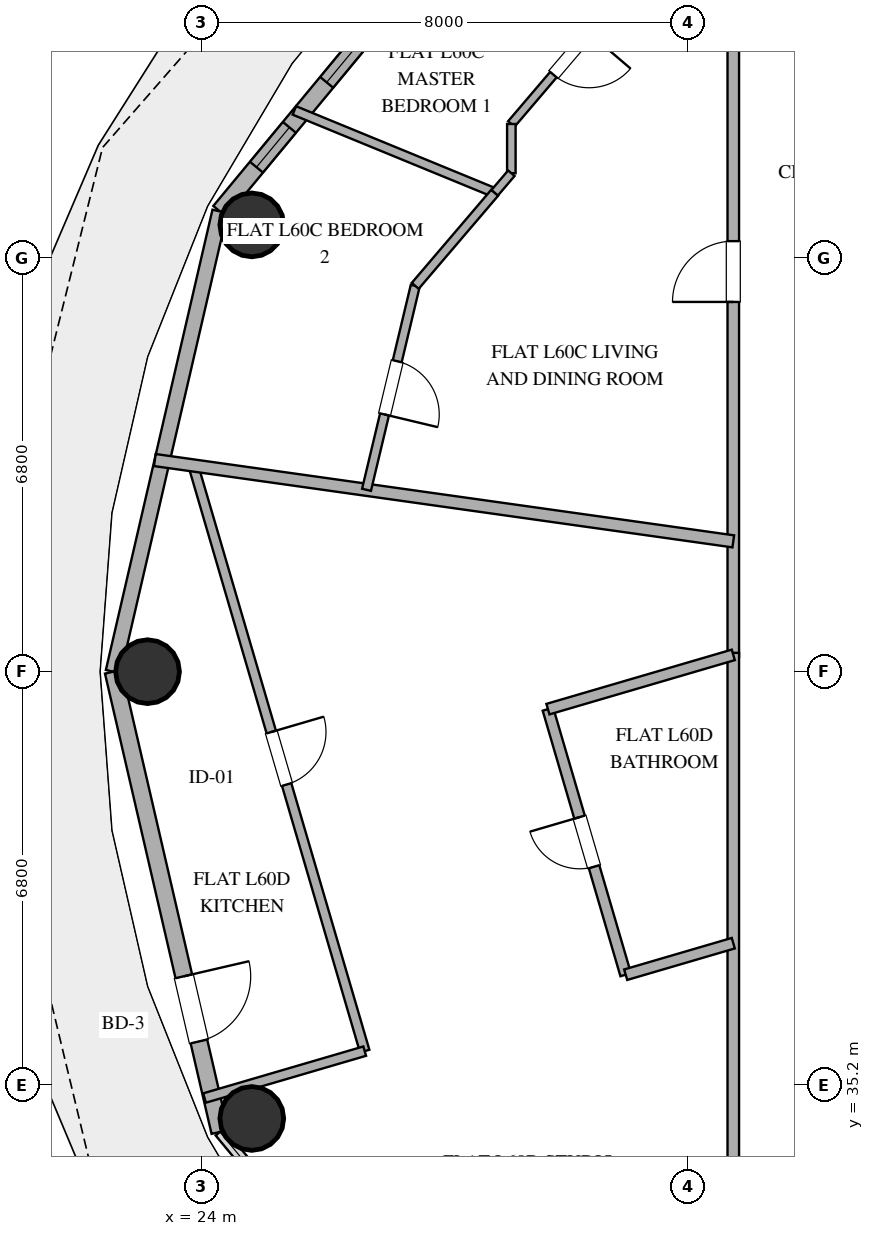
"""IFC4 building model, lengths in metres.
Left out: names, types, materials, properties, quantities, classifications, styles, units other than length and angle.
Written with IfcOpenShell. Run it as: python <this file> out.ifc"""

import sys

from ifc_helpers import new_model, si_unit, direction, frame, frame_2d, origin, origin_2d, place, context, subcontext, project, spatial, rectangle, hollow_circle, extrude, element, fill, save


model = new_model("IFC4")
c1 = context("Model", 3, precision=1e-05, world=origin(), true_north=direction((0.0, 1.0)))
c2 = subcontext(c1, "Body", "Model", "MODEL_VIEW")
j1 = project(units=[si_unit("LENGTHUNIT", "METRE"), si_unit("PLANEANGLEUNIT", "RADIAN")], contexts=[c1])
p1 = place(None, origin())
s1 = spatial("IfcSite", under=j1, at=p1, CompositionType="ELEMENT")
p2 = place(p1, origin())
s2 = spatial("IfcBuilding", under=s1, at=p2, CompositionType="ELEMENT")
p3 = place(p2, frame((0.0, 0.0, 235.2)))
s3 = spatial("IfcBuildingStorey", under=s2, at=p3, CompositionType="ELEMENT", Elevation=235.2)
for number, where, z_axis, x_axis in (
    (1, (24.831, 49.347, 0.0), (0.0, 0.0, 1.0), (1.0, 0.0, 0.0)),
    (2, (23.117, 42.0, 0.0), (0.0, 0.0, 1.0), (1.0, 0.0, 0.0)),
    (3, (24.831, 34.653, 0.0), (0.0, 0.0, 1.0), (1.0, 0.0, 0.0)),
):
    element("IfcColumn", number, at=place(p3, frame(where, z_axis=z_axis, x_axis=x_axis)), inside=s3, PredefinedType="COLUMN", context=c2, shape_type="SweptSolid", body=[
        extrude(hollow_circle(Radius=0.525, WallThickness=0.028, at=origin_2d()), origin(), (0.0, 0.0, 1.0), 3.36),
    ])
p4 = place(p3, frame((29.617, 55.987, 0.0), z_axis=(0.0, 0.0, 1.0), x_axis=(-0.63761509934, -0.770355103243, 0.0)))
e4 = element("IfcWall", 4, at=p4, inside=s3, PredefinedType="SOLIDWALL", context=c2, shape_type="SweptSolid", body=[
    extrude(rectangle(XDim=8.33, YDim=0.28, at=frame_2d((4.165, 0.0))), origin(), (0.0, 0.0, 1.0), 3.36),
])
p5 = place(p4, frame((2.131, 0.0, 0.85)))
e5 = element("IfcOpeningElement", 5, at=p5, cuts=e4, PredefinedType="OPENING", context=c2, shape_type="SweptSolid", body=[
    extrude(rectangle(XDim=1.5, YDim=2.0, at=frame_2d((0.75, 1.0))), frame((0.0, 0.15, 0.0), z_axis=(0.0, -1.0, 0.0), x_axis=(1.0, 0.0, 0.0)), (0.0, 0.0, 1.0), 0.3),
])
p6 = place(p4, frame((4.075, 0.0, 0.85)))
e6 = element("IfcOpeningElement", 6, at=p6, cuts=e4, PredefinedType="OPENING", context=c2, shape_type="SweptSolid", body=[
    extrude(rectangle(XDim=1.5, YDim=2.0, at=frame_2d((0.75, 1.0))), frame((0.0, 0.15, 0.0), z_axis=(0.0, -1.0, 0.0), x_axis=(1.0, 0.0, 0.0)), (0.0, 0.0, 1.0), 0.3),
])
p7 = place(p4, frame((6.536, 0.0, 0.85)))
e7 = element("IfcOpeningElement", 7, at=p7, cuts=e4, PredefinedType="OPENING", context=c2, shape_type="SweptSolid", body=[
    extrude(rectangle(XDim=0.85, YDim=1.8, at=frame_2d((0.425, 0.9))), frame((0.0, 0.15, 0.0), z_axis=(0.0, -1.0, 0.0), x_axis=(1.0, 0.0, 0.0)), (0.0, 0.0, 1.0), 0.3),
])
p8 = place(p3, frame((24.306, 49.57, 0.0), z_axis=(0.0, 0.0, 1.0), x_axis=(-0.225635078214, -0.974211892495, 0.0)))
e8 = element("IfcWall", 8, at=p8, inside=s3, PredefinedType="SOLIDWALL", context=c2, shape_type="SweptSolid", body=[
    extrude(rectangle(XDim=7.77, YDim=0.25, at=frame_2d((3.885, 0.0))), origin(), (0.0, 0.0, 1.0), 3.36),
])
p9 = place(p3, frame((22.553, 42.0, 0.0), z_axis=(0.0, 0.0, 1.0), x_axis=(0.225635078214, -0.974211892495, 0.0)))
e9 = element("IfcWall", 9, at=p9, inside=s3, PredefinedType="SOLIDWALL", context=c2, shape_type="SweptSolid", body=[
    extrude(rectangle(XDim=7.77, YDim=0.28, at=frame_2d((3.885, 0.0))), origin(), (0.0, 0.0, 1.0), 3.36),
])
p10 = place(p9, frame((5.142, 0.0, 0.0)))
e10 = element("IfcOpeningElement", 10, at=p10, cuts=e9, PredefinedType="OPENING", context=c2, shape_type="SweptSolid", body=[
    extrude(rectangle(XDim=1.1, YDim=2.25, at=frame_2d((0.55, 1.125))), frame((0.0, 0.15, 0.0), z_axis=(0.0, -1.0, 0.0), x_axis=(1.0, 0.0, 0.0)), (0.0, 0.0, 1.0), 0.3),
])
p11 = place(p3, frame((23.868, 45.392, 0.0), z_axis=(0.0, 0.0, 1.0), x_axis=(0.281018983641, -0.959702209455, 0.0)))
e11 = element("IfcWall", 11, at=p11, inside=s3, PredefinedType="PLUMBINGWALL", context=c2, shape_type="SweptSolid", body=[
    extrude(rectangle(XDim=10.036, YDim=0.16, at=frame_2d((5.018, 0.0))), origin(), (0.0, 0.0, 1.0), 2.72),
])
p12 = place(p11, frame((4.568, 0.0, 0.0)))
e12 = element("IfcOpeningElement", 12, at=p12, cuts=e11, PredefinedType="OPENING", context=c2, shape_type="SweptSolid", body=[
    extrude(rectangle(XDim=0.9, YDim=2.1, at=frame_2d((0.45, 1.05))), frame((0.0, 0.09, 0.0), z_axis=(0.0, -1.0, 0.0), x_axis=(1.0, 0.0, 0.0)), (0.0, 0.0, 1.0), 0.18),
])
p13 = place(p3, frame((32.75, 42.243, 0.0), z_axis=(0.0, 0.0, 1.0), x_axis=(0.0, 1.0, 0.0)))
e13 = element("IfcWall", 13, at=p13, inside=s3, PredefinedType="PARTITIONING", context=c2, shape_type="SweptSolid", body=[
    extrude(rectangle(XDim=10.807, YDim=0.19, at=frame_2d((5.404, 0.0))), origin(), (0.0, 0.0, 1.0), 2.72),
])
p14 = place(p13, frame((5.837, 0.0, 0.0)))
e14 = element("IfcOpeningElement", 14, at=p14, cuts=e13, PredefinedType="OPENING", context=c2, shape_type="SweptSolid", body=[
    extrude(rectangle(XDim=1.0, YDim=2.2, at=frame_2d((0.5, 1.1))), frame((0.0, 0.105, 0.0), z_axis=(0.0, -1.0, 0.0), x_axis=(1.0, 0.0, 0.0)), (0.0, 0.0, 1.0), 0.21),
])
p15 = place(p3, frame((32.75, 30.95, 0.0), z_axis=(0.0, 0.0, 1.0), x_axis=(0.0, 1.0, 0.0)))
e15 = element("IfcWall", 15, at=p15, inside=s3, PredefinedType="PARTITIONING", context=c2, shape_type="SweptSolid", body=[
    extrude(rectangle(XDim=11.36, YDim=0.19, at=frame_2d((5.68, 0.0))), origin(), (0.0, 0.0, 1.0), 2.72),
])
p16 = place(p3, frame((23.237, 45.48, 0.0), z_axis=(0.0, 0.0, 1.0), x_axis=(0.990269661234, -0.139161769316, 0.0)))
e16 = element("IfcWall", 16, at=p16, inside=s3, PredefinedType="PARTITIONING", context=c2, shape_type="SweptSolid", body=[
    extrude(rectangle(XDim=9.607, YDim=0.2, at=frame_2d((4.803, 0.0))), origin(), (0.0, 0.0, 1.0), 2.72),
])
p17 = place(p3, frame((30.98, 37.017, 0.0), z_axis=(0.0, 0.0, 1.0), x_axis=(-0.281021691617, 0.959701416504, 0.0)))
e17 = element("IfcWall", 17, at=p17, inside=s3, PredefinedType="PLUMBINGWALL", context=c2, shape_type="SweptSolid", body=[
    extrude(rectangle(XDim=4.551, YDim=0.18, at=frame_2d((2.275, 0.0))), origin(), (0.0, 0.0, 1.0), 2.72),
])
p18 = place(p17, frame((1.85, 0.0, 0.0)))
e18 = element("IfcOpeningElement", 18, at=p18, cuts=e17, PredefinedType="OPENING", context=c2, shape_type="SweptSolid", body=[
    extrude(rectangle(XDim=0.85, YDim=2.1, at=frame_2d((0.425, 1.05))), frame((0.0, 0.1, 0.0), z_axis=(0.0, -1.0, 0.0), x_axis=(1.0, 0.0, 0.0)), (0.0, 0.0, 1.0), 0.2),
])
p19 = place(p3, frame((25.531, 51.229, 0.0), z_axis=(0.0, 0.0, 1.0), x_axis=(0.925009924445, -0.37994294266, 0.0)))
e19 = element("IfcWall", 19, at=p19, inside=s3, PredefinedType="PARTITIONING", context=c2, shape_type="SweptSolid", body=[
    extrude(rectangle(XDim=3.562, YDim=0.15, at=frame_2d((1.781, 0.0))), origin(), (0.0, 0.0, 1.0), 2.72),
])
p20 = place(p3, frame((27.519, 48.345, 0.0), z_axis=(0.0, 0.0, 1.0), x_axis=(-0.232293676314, -0.97264569497, 0.0)))
e20 = element("IfcWall", 20, at=p20, inside=s3, PredefinedType="PARTITIONING", context=c2, shape_type="SweptSolid", body=[
    extrude(rectangle(XDim=3.448, YDim=0.15, at=frame_2d((1.724, 0.0))), origin(), (0.0, 0.0, 1.0), 2.72),
])
p21 = place(p20, frame((1.274, 0.0, 0.0)))
e21 = element("IfcOpeningElement", 21, at=p21, cuts=e20, PredefinedType="OPENING", context=c2, shape_type="SweptSolid", body=[
    extrude(rectangle(XDim=0.9, YDim=2.1, at=frame_2d((0.45, 1.05))), frame((0.0, 0.085, 0.0), z_axis=(0.0, -1.0, 0.0), x_axis=(1.0, 0.0, 0.0)), (0.0, 0.0, 1.0), 0.17),
])
p22 = place(p3, frame((29.702, 41.384, 0.0), z_axis=(0.0, 0.0, 1.0), x_axis=(0.959705055225, 0.281009264929, 0.0)))
e22 = element("IfcWall", 22, at=p22, inside=s3, PredefinedType="PLUMBINGWALL", context=c2, shape_type="SweptSolid", body=[
    extrude(rectangle(XDim=3.176, YDim=0.18, at=frame_2d((1.588, 0.0))), origin(), (0.0, 0.0, 1.0), 2.72),
])
p23 = place(p3, frame((31.689, 54.042, 0.0), z_axis=(0.0, 0.0, 1.0), x_axis=(-0.648985159088, -0.760801066826, 0.0)))
e23 = element("IfcWall", 23, at=p23, inside=s3, PredefinedType="PARTITIONING", context=c2, shape_type="SweptSolid", body=[
    extrude(rectangle(XDim=3.989, YDim=0.14, at=frame_2d((1.995, 0.0))), origin(), (0.0, 0.0, 1.0), 2.72),
])
p24 = place(p23, frame((2.023, 0.0, 0.0)))
e24 = element("IfcOpeningElement", 24, at=p24, cuts=e23, PredefinedType="OPENING", context=c2, shape_type="SweptSolid", body=[
    extrude(rectangle(XDim=0.9, YDim=2.1, at=frame_2d((0.45, 1.05))), frame((0.0, 0.08, 0.0), z_axis=(0.0, -1.0, 0.0), x_axis=(1.0, 0.0, 0.0)), (0.0, 0.0, 1.0), 0.16),
])
p25 = place(p3, frame((26.688, 35.76, 0.0), z_axis=(0.0, 0.0, 1.0), x_axis=(-0.959690607454, -0.281058602368, 0.0)))
e25 = element("IfcWall", 25, at=p25, inside=s3, PredefinedType="PLUMBINGWALL", context=c2, shape_type="SweptSolid", body=[
    extrude(rectangle(XDim=2.745, YDim=0.16, at=frame_2d((1.373, 0.0))), origin(), (0.0, 0.0, 1.0), 2.72),
])
p26 = place(p3, frame((28.826, 49.876, 0.0), z_axis=(0.0, 0.0, 1.0), x_axis=(-0.649252114502, -0.760573265251, 0.0)))
e26 = element("IfcWall", 26, at=p26, inside=s3, PredefinedType="PARTITIONING", context=c2, shape_type="SweptSolid", body=[
    extrude(rectangle(XDim=2.013, YDim=0.15, at=frame_2d((1.007, 0.0))), origin(), (0.0, 0.0, 1.0), 2.72),
])
p27 = place(p3, frame((32.75, 37.535, 0.0), z_axis=(0.0, 0.0, 1.0), x_axis=(-0.959679055102, -0.281098045527, 0.0)))
e27 = element("IfcWall", 27, at=p27, inside=s3, PredefinedType="PLUMBINGWALL", context=c2, shape_type="SweptSolid", body=[
    extrude(rectangle(XDim=1.844, YDim=0.18, at=frame_2d((0.922, 0.0))), origin(), (0.0, 0.0, 1.0), 2.72),
])
p28 = place(p3, frame((29.1, 51.007, 0.0), z_axis=(0.0, 0.0, 1.0), x_axis=(0.0, -1.0, 0.0)))
e28 = element("IfcWall", 28, at=p28, inside=s3, PredefinedType="PARTITIONING", context=c2, shape_type="SweptSolid", body=[
    extrude(rectangle(XDim=0.81, YDim=0.14, at=frame_2d((0.405, 0.0))), origin(), (0.0, 0.0, 1.0), 2.72),
])
p29 = place(p3, frame((29.1, 50.197, 0.0), z_axis=(0.0, 0.0, 1.0), x_axis=(-0.649360360175, -0.760480849617, 0.0)))
e29 = element("IfcWall", 29, at=p29, inside=s3, PredefinedType="PARTITIONING", context=c2, shape_type="SweptSolid", body=[
    extrude(rectangle(XDim=0.422, YDim=0.14, at=frame_2d((0.211, 0.0))), origin(), (0.0, 0.0, 1.0), 2.72),
])
p30 = place(p6, origin())
e30 = element("IfcWindow", 30, at=p30, inside=s3, PartitioningType="SINGLE_PANEL", PredefinedType="WINDOW", context=c2, shape_type="SweptSolid", body=[
    extrude(rectangle(XDim=1.5, YDim=2.0, at=frame_2d((0.75, 1.0))), frame((0.0, 0.03, 0.0), z_axis=(0.0, -1.0, 0.0), x_axis=(1.0, 0.0, 0.0)), (0.0, 0.0, 1.0), 0.06),
])
fill(e6, e30)
p31 = place(p10, origin())
e31 = element("IfcDoor", 31, at=p31, inside=s3, OperationType="SINGLE_SWING_LEFT", PredefinedType="DOOR", context=c2, shape_type="SweptSolid", body=[
    extrude(rectangle(XDim=1.1, YDim=2.25, at=frame_2d((0.55, 1.125))), frame((0.0, 0.025, 0.0), z_axis=(0.0, -1.0, 0.0), x_axis=(1.0, 0.0, 0.0)), (0.0, 0.0, 1.0), 0.05),
])
fill(e10, e31)
p32 = place(p7, origin())
e32 = element("IfcWindow", 32, at=p32, inside=s3, PartitioningType="SINGLE_PANEL", PredefinedType="WINDOW", context=c2, shape_type="SweptSolid", body=[
    extrude(rectangle(XDim=0.85, YDim=1.8, at=frame_2d((0.425, 0.9))), frame((0.0, 0.03, 0.0), z_axis=(0.0, -1.0, 0.0), x_axis=(1.0, 0.0, 0.0)), (0.0, 0.0, 1.0), 0.06),
])
fill(e7, e32)
p33 = place(p12, origin())
e33 = element("IfcDoor", 33, at=p33, inside=s3, OperationType="SINGLE_SWING_LEFT", PredefinedType="DOOR", context=c2, shape_type="SweptSolid", body=[
    extrude(rectangle(XDim=0.9, YDim=2.1, at=frame_2d((0.45, 1.05))), frame((0.0, 0.025, 0.0), z_axis=(0.0, -1.0, 0.0), x_axis=(1.0, 0.0, 0.0)), (0.0, 0.0, 1.0), 0.05),
])
fill(e12, e33)
p34 = place(p14, origin())
e34 = element("IfcDoor", 34, at=p34, inside=s3, OperationType="SINGLE_SWING_LEFT", PredefinedType="DOOR", context=c2, shape_type="SweptSolid", body=[
    extrude(rectangle(XDim=1.0, YDim=2.2, at=frame_2d((0.5, 1.1))), frame((0.0, 0.025, 0.0), z_axis=(0.0, -1.0, 0.0), x_axis=(1.0, 0.0, 0.0)), (0.0, 0.0, 1.0), 0.05),
])
fill(e14, e34)
p35 = place(p18, origin())
e35 = element("IfcDoor", 35, at=p35, inside=s3, OperationType="SINGLE_SWING_RIGHT", PredefinedType="DOOR", context=c2, shape_type="SweptSolid", body=[
    extrude(rectangle(XDim=0.85, YDim=2.1, at=frame_2d((0.425, 1.05))), frame((0.0, 0.025, 0.0), z_axis=(0.0, -1.0, 0.0), x_axis=(1.0, 0.0, 0.0)), (0.0, 0.0, 1.0), 0.05),
])
fill(e18, e35)
p36 = place(p21, origin())
e36 = element("IfcDoor", 36, at=p36, inside=s3, OperationType="SINGLE_SWING_RIGHT", PredefinedType="DOOR", context=c2, shape_type="SweptSolid", body=[
    extrude(rectangle(XDim=0.9, YDim=2.1, at=frame_2d((0.45, 1.05))), frame((0.0, 0.025, 0.0), z_axis=(0.0, -1.0, 0.0), x_axis=(1.0, 0.0, 0.0)), (0.0, 0.0, 1.0), 0.05),
])
fill(e21, e36)
p37 = place(p24, origin())
e37 = element("IfcDoor", 37, at=p37, inside=s3, OperationType="SINGLE_SWING_LEFT", PredefinedType="DOOR", context=c2, shape_type="SweptSolid", body=[
    extrude(rectangle(XDim=0.9, YDim=2.1, at=frame_2d((0.45, 1.05))), frame((0.0, 0.025, 0.0), z_axis=(0.0, -1.0, 0.0), x_axis=(1.0, 0.0, 0.0)), (0.0, 0.0, 1.0), 0.05),
])
fill(e24, e37)
save(model, sys.argv[1])
